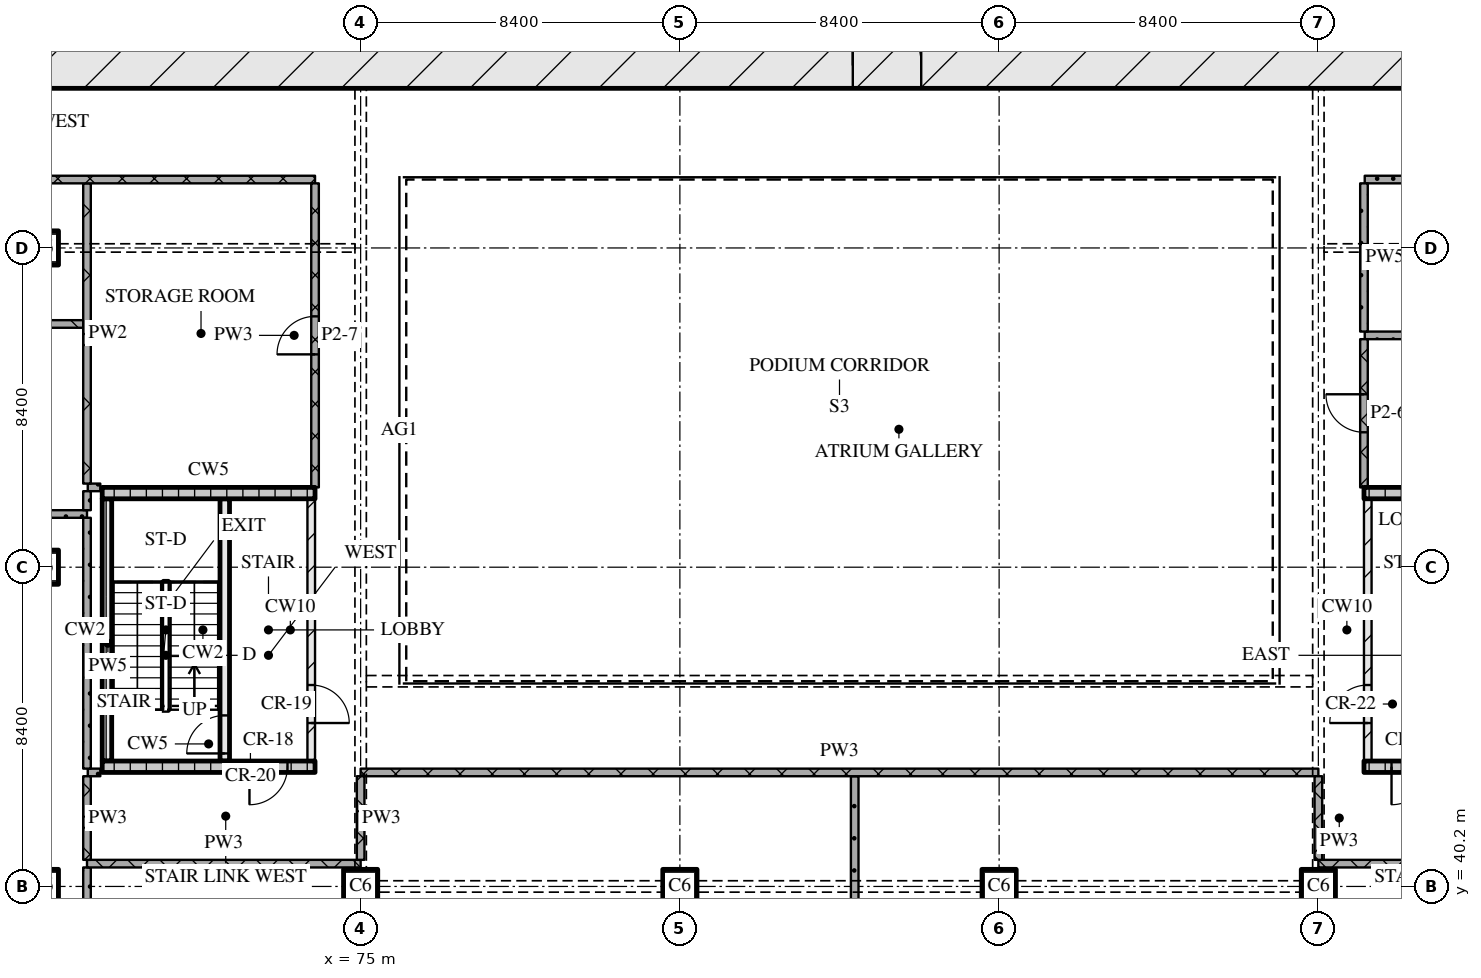
"""IFC4 building model, lengths in metres.
Left out: names, types, materials, properties, quantities, classifications, styles, units other than length and angle.
Written with IfcOpenShell. Run it as: python <this file> out.ifc"""

import sys

from ifc_helpers import new_model, si_unit, direction, frame, frame_2d, origin, origin_2d, place, context, subcontext, project, spatial, rectangle, extrude, element, fill, save


model = new_model("IFC4")
c1 = context("Model", 3, precision=1e-05, world=origin(), true_north=direction((0.0, 1.0)))
c2 = subcontext(c1, "Body", "Model", "MODEL_VIEW")
j1 = project(units=[si_unit("LENGTHUNIT", "METRE"), si_unit("PLANEANGLEUNIT", "RADIAN")], contexts=[c1])
p1 = place(None, origin())
s1 = spatial("IfcSite", under=j1, at=p1, CompositionType="ELEMENT")
p2 = place(p1, origin())
s2 = spatial("IfcBuilding", under=s1, at=p2, CompositionType="ELEMENT")
p3 = place(p2, frame((0.0, 0.0, 14.4)))
s3 = spatial("IfcBuildingStorey", under=s2, at=p3, CompositionType="ELEMENT", Elevation=14.4)
for number, where, z_axis, x_axis in (
    (1, (66.6, 40.2, 0.0), (0.0, 0.0, 1.0), (1.0, 0.0, 0.0)),
    (2, (66.6, 48.6, 0.0), (0.0, 0.0, 1.0), (1.0, 0.0, 0.0)),
    (3, (66.6, 57.0, 0.0), (0.0, 0.0, 1.0), (1.0, 0.0, 0.0)),
    (4, (75.0, 40.2, 0.0), (0.0, 0.0, 1.0), (1.0, 0.0, 0.0)),
    (5, (83.4, 40.2, 0.0), (0.0, 0.0, 1.0), (1.0, 0.0, 0.0)),
    (6, (91.8, 40.2, 0.0), (0.0, 0.0, 1.0), (1.0, 0.0, 0.0)),
    (7, (100.2, 40.2, 0.0), (0.0, 0.0, 1.0), (1.0, 0.0, 0.0)),
):
    element("IfcColumn", number, at=place(p3, frame(where, z_axis=z_axis, x_axis=x_axis)), inside=s3, PredefinedType="COLUMN", context=c2, shape_type="SweptSolid", body=[
        extrude(rectangle(XDim=0.9, YDim=0.9, at=origin_2d()), origin(), (0.0, 0.0, 1.0), 4.8),
    ])
p4 = place(p3, frame((66.6, 61.8, 0.0), z_axis=(0.0, 0.0, 1.0), x_axis=(1.0, 0.0, 0.0)))
e8 = element("IfcWall", 8, at=p4, inside=s3, PredefinedType="SOLIDWALL", context=c2, shape_type="SweptSolid", body=[
    extrude(rectangle(XDim=42.0, YDim=1.2, at=frame_2d((21.0, 0.0))), origin(), (0.0, 0.0, 1.0), 4.5),
])
p5 = place(p4, frame((21.35, 0.0, 0.0)))
e9 = element("IfcOpeningElement", 9, at=p5, cuts=e8, PredefinedType="OPENING", context=c2, shape_type="SweptSolid", body=[
    extrude(rectangle(XDim=1.8, YDim=2.1, at=frame_2d((0.9, 1.05))), frame((0.0, 0.61, 0.0), z_axis=(0.0, -1.0, 0.0), x_axis=(1.0, 0.0, 0.0)), (0.0, 0.0, 1.0), 1.22),
])
p6 = place(p3, frame((68.2, 43.35, 0.0), z_axis=(0.0, 0.0, 1.0), x_axis=(1.0, 0.0, 0.0)))
e10 = element("IfcWall", 10, at=p6, inside=s3, PredefinedType="SOLIDWALL", context=c2, shape_type="SweptSolid", body=[
    extrude(rectangle(XDim=5.6, YDim=0.3, at=frame_2d((2.8, 0.0))), origin(), (0.0, 0.0, 1.0), 4.5),
])
p7 = place(p6, frame((3.875, 0.0, 0.0)))
e11 = element("IfcOpeningElement", 11, at=p7, cuts=e10, PredefinedType="OPENING", context=c2, shape_type="SweptSolid", body=[
    extrude(rectangle(XDim=1.0, YDim=2.1, at=frame_2d((0.5, 1.05))), frame((0.0, 0.16, 0.0), z_axis=(0.0, -1.0, 0.0), x_axis=(1.0, 0.0, 0.0)), (0.0, 0.0, 1.0), 0.32),
])
p8 = place(p3, frame((68.325, 43.5, 0.0), z_axis=(0.0, 0.0, 1.0), x_axis=(0.0, 1.0, 0.0)))
e12 = element("IfcWall", 12, at=p8, inside=s3, PredefinedType="SOLIDWALL", context=c2, shape_type="SweptSolid", body=[
    extrude(rectangle(XDim=6.9, YDim=0.25, at=frame_2d((3.45, 0.0))), origin(), (0.0, 0.0, 1.0), 4.5),
])
p9 = place(p3, frame((71.425, 43.5, 0.0), z_axis=(0.0, 0.0, 1.0), x_axis=(0.0, 1.0, 0.0)))
e13 = element("IfcWall", 13, at=p9, inside=s3, PredefinedType="SOLIDWALL", context=c2, shape_type="SweptSolid", body=[
    extrude(rectangle(XDim=6.9, YDim=0.25, at=frame_2d((3.45, 0.0))), origin(), (0.0, 0.0, 1.0), 4.5),
])
p10 = place(p9, frame((0.2, 0.0, 0.0)))
e14 = element("IfcOpeningElement", 14, at=p10, cuts=e13, PredefinedType="OPENING", context=c2, shape_type="SweptSolid", body=[
    extrude(rectangle(XDim=1.0, YDim=2.1, at=frame_2d((0.5, 1.05))), frame((0.0, 0.135, 0.0), z_axis=(0.0, -1.0, 0.0), x_axis=(1.0, 0.0, 0.0)), (0.0, 0.0, 1.0), 0.27),
])
p11 = place(p3, frame((73.7, 43.5, 0.0), z_axis=(0.0, 0.0, 1.0), x_axis=(0.0, 1.0, 0.0)))
e15 = element("IfcWall", 15, at=p11, inside=s3, PredefinedType="PARTITIONING", context=c2, shape_type="SweptSolid", body=[
    extrude(rectangle(XDim=6.9, YDim=0.2, at=frame_2d((3.45, 0.0))), origin(), (0.0, 0.0, 1.0), 4.5),
])
p12 = place(p11, frame((1.0, 0.0, 0.0)))
e16 = element("IfcOpeningElement", 16, at=p12, cuts=e15, PredefinedType="OPENING", context=c2, shape_type="SweptSolid", body=[
    extrude(rectangle(XDim=1.0, YDim=2.1, at=frame_2d((0.5, 1.05))), frame((0.0, 0.11, 0.0), z_axis=(0.0, -1.0, 0.0), x_axis=(1.0, 0.0, 0.0)), (0.0, 0.0, 1.0), 0.22),
])
p13 = place(p3, frame((68.2, 50.55, 0.0), z_axis=(0.0, 0.0, 1.0), x_axis=(1.0, 0.0, 0.0)))
e17 = element("IfcWall", 17, at=p13, inside=s3, PredefinedType="SOLIDWALL", context=c2, shape_type="SweptSolid", body=[
    extrude(rectangle(XDim=5.6, YDim=0.3, at=frame_2d((2.8, 0.0))), origin(), (0.0, 0.0, 1.0), 4.5),
])
p14 = place(p3, frame((101.4, 43.35, 0.0), z_axis=(0.0, 0.0, 1.0), x_axis=(1.0, 0.0, 0.0)))
e18 = element("IfcWall", 18, at=p14, inside=s3, PredefinedType="SOLIDWALL", context=c2, shape_type="SweptSolid", body=[
    extrude(rectangle(XDim=5.6, YDim=0.3, at=frame_2d((2.8, 0.0))), origin(), (0.0, 0.0, 1.0), 4.5),
])
p15 = place(p14, frame((0.725, 0.0, 0.0)))
e19 = element("IfcOpeningElement", 19, at=p15, cuts=e18, PredefinedType="OPENING", context=c2, shape_type="SweptSolid", body=[
    extrude(rectangle(XDim=1.0, YDim=2.1, at=frame_2d((0.5, 1.05))), frame((0.0, 0.16, 0.0), z_axis=(0.0, -1.0, 0.0), x_axis=(1.0, 0.0, 0.0)), (0.0, 0.0, 1.0), 0.32),
])
p16 = place(p3, frame((101.5, 43.5, 0.0), z_axis=(0.0, 0.0, 1.0), x_axis=(0.0, 1.0, 0.0)))
e20 = element("IfcWall", 20, at=p16, inside=s3, PredefinedType="PARTITIONING", context=c2, shape_type="SweptSolid", body=[
    extrude(rectangle(XDim=6.9, YDim=0.2, at=frame_2d((3.45, 0.0))), origin(), (0.0, 0.0, 1.0), 4.5),
])
p17 = place(p16, frame((1.0, 0.0, 0.0)))
e21 = element("IfcOpeningElement", 21, at=p17, cuts=e20, PredefinedType="OPENING", context=c2, shape_type="SweptSolid", body=[
    extrude(rectangle(XDim=1.0, YDim=2.1, at=frame_2d((0.5, 1.05))), frame((0.0, 0.11, 0.0), z_axis=(0.0, -1.0, 0.0), x_axis=(1.0, 0.0, 0.0)), (0.0, 0.0, 1.0), 0.22),
])
p18 = place(p3, frame((101.4, 50.55, 0.0), z_axis=(0.0, 0.0, 1.0), x_axis=(1.0, 0.0, 0.0)))
e22 = element("IfcWall", 22, at=p18, inside=s3, PredefinedType="SOLIDWALL", context=c2, shape_type="SweptSolid", body=[
    extrude(rectangle(XDim=5.6, YDim=0.3, at=frame_2d((2.8, 0.0))), origin(), (0.0, 0.0, 1.0), 4.5),
])
for number, where, z_axis, x_axis in (
    (23, (67.8, 40.8, 0.0), (0.0, 0.0, 1.0), (1.0, 0.0, 0.0)),
    (24, (100.2, 40.8, 0.0), (0.0, 0.0, 1.0), (1.0, 0.0, 0.0)),
):
    element("IfcWall", number, at=place(p3, frame(where, z_axis=z_axis, x_axis=x_axis)), inside=s3, PredefinedType="PARTITIONING", context=c2, shape_type="SweptSolid", body=[
        extrude(rectangle(XDim=7.2, YDim=0.2, at=frame_2d((3.6, 0.0))), origin(), (0.0, 0.0, 1.0), 4.5),
    ])
p19 = place(p3, frame((75.0, 43.2, 0.0), z_axis=(0.0, 0.0, 1.0), x_axis=(1.0, 0.0, 0.0)))
e25 = element("IfcWall", 25, at=p19, inside=s3, PredefinedType="PARTITIONING", context=c2, shape_type="SweptSolid", body=[
    extrude(rectangle(XDim=25.2, YDim=0.2, at=frame_2d((12.6, 0.0))), origin(), (0.0, 0.0, 1.0), 4.5),
])
p20 = place(p3, frame((67.82, 43.2, 0.0), z_axis=(0.0, 0.0, 1.0), x_axis=(1.0, 0.0, 0.0)))
e26 = element("IfcWall", 26, at=p20, inside=s3, PredefinedType="PARTITIONING", context=c2, shape_type="SweptSolid", body=[
    extrude(rectangle(XDim=0.33, YDim=0.2, at=frame_2d((0.165, 0.0))), origin(), (0.0, 0.0, 1.0), 4.5),
])
p21 = place(p3, frame((35.5, 50.0, 0.0), z_axis=(0.0, 0.0, 1.0), x_axis=(1.0, 0.0, 0.0)))
e27 = element("IfcWall", 27, at=p21, inside=s3, PredefinedType="PARTITIONING", context=c2, shape_type="SweptSolid", body=[
    extrude(rectangle(XDim=32.3, YDim=0.2, at=frame_2d((16.15, 0.0))), origin(), (0.0, 0.0, 1.0), 4.5),
])
p22 = place(p3, frame((67.82, 50.7, 0.0), z_axis=(0.0, 0.0, 1.0), x_axis=(1.0, 0.0, 0.0)))
e28 = element("IfcWall", 28, at=p22, inside=s3, PredefinedType="PARTITIONING", context=c2, shape_type="SweptSolid", body=[
    extrude(rectangle(XDim=0.33, YDim=0.2, at=frame_2d((0.165, 0.0))), origin(), (0.0, 0.0, 1.0), 4.5),
])
p23 = place(p3, frame((101.42, 54.7, 0.0), z_axis=(0.0, 0.0, 1.0), x_axis=(1.0, 0.0, 0.0)))
e29 = element("IfcWall", 29, at=p23, inside=s3, PredefinedType="PARTITIONING", context=c2, shape_type="SweptSolid", body=[
    extrude(rectangle(XDim=5.96, YDim=0.2, at=frame_2d((2.98, 0.0))), origin(), (0.0, 0.0, 1.0), 4.5),
])
p24 = place(p3, frame((35.5, 55.0, 0.0), z_axis=(0.0, 0.0, 1.0), x_axis=(1.0, 0.0, 0.0)))
e30 = element("IfcWall", 30, at=p24, inside=s3, PredefinedType="PARTITIONING", context=c2, shape_type="SweptSolid", body=[
    extrude(rectangle(XDim=32.2, YDim=0.2, at=frame_2d((16.1, 0.0))), origin(), (0.0, 0.0, 1.0), 4.5),
])
p25 = place(p3, frame((73.8, 58.8, 0.0), z_axis=(0.0, 0.0, 1.0), x_axis=(-1.0, 0.0, 0.0)))
e31 = element("IfcWall", 31, at=p25, inside=s3, PredefinedType="PARTITIONING", context=c2, shape_type="SweptSolid", body=[
    extrude(rectangle(XDim=38.4, YDim=0.2, at=frame_2d((19.2, 0.0))), origin(), (0.0, 0.0, 1.0), 4.5),
])
p26 = place(p25, frame((21.7, 0.0, 0.0)))
e32 = element("IfcOpeningElement", 32, at=p26, cuts=e31, PredefinedType="OPENING", context=c2, shape_type="SweptSolid", body=[
    extrude(rectangle(XDim=1.0, YDim=2.1, at=frame_2d((0.5, 1.05))), frame((0.0, 0.11, 0.0), z_axis=(0.0, -1.0, 0.0), x_axis=(1.0, 0.0, 0.0)), (0.0, 0.0, 1.0), 0.22),
])
p27 = place(p3, frame((101.42, 58.8, 0.0), z_axis=(0.0, 0.0, 1.0), x_axis=(1.0, 0.0, 0.0)))
e33 = element("IfcWall", 33, at=p27, inside=s3, PredefinedType="PARTITIONING", context=c2, shape_type="SweptSolid", body=[
    extrude(rectangle(XDim=38.36, YDim=0.2, at=frame_2d((19.18, 0.0))), origin(), (0.0, 0.0, 1.0), 4.5),
])
p28 = place(p3, frame((67.8, 43.1, 0.0), z_axis=(0.0, 0.0, 1.0), x_axis=(0.0, -1.0, 0.0)))
e34 = element("IfcWall", 34, at=p28, inside=s3, PredefinedType="PARTITIONING", context=c2, shape_type="SweptSolid", body=[
    extrude(rectangle(XDim=2.2, YDim=0.2, at=frame_2d((1.1, 0.0))), origin(), (0.0, 0.0, 1.0), 4.5),
])
p29 = place(p3, frame((67.8, 58.7, 0.0), z_axis=(0.0, 0.0, 1.0), x_axis=(0.0, -1.0, 0.0)))
e35 = element("IfcWall", 35, at=p29, inside=s3, PredefinedType="PARTITIONING", context=c2, shape_type="SweptSolid", body=[
    extrude(rectangle(XDim=7.9, YDim=0.2, at=frame_2d((3.95, 0.0))), origin(), (0.0, 0.0, 1.0), 4.5),
])
p30 = place(p3, frame((67.8, 49.9, 0.0), z_axis=(0.0, 0.0, 1.0), x_axis=(0.0, -1.0, 0.0)))
e36 = element("IfcWall", 36, at=p30, inside=s3, PredefinedType="PARTITIONING", context=c2, shape_type="SweptSolid", body=[
    extrude(rectangle(XDim=6.6, YDim=0.2, at=frame_2d((3.3, 0.0))), origin(), (0.0, 0.0, 1.0), 4.5),
])
p31 = place(p3, frame((67.8, 50.6, 0.0), z_axis=(0.0, 0.0, 1.0), x_axis=(0.0, -1.0, 0.0)))
e37 = element("IfcWall", 37, at=p31, inside=s3, PredefinedType="PARTITIONING", context=c2, shape_type="SweptSolid", body=[
    extrude(rectangle(XDim=0.5, YDim=0.2, at=frame_2d((0.25, 0.0))), origin(), (0.0, 0.0, 1.0), 4.5),
])
p32 = place(p3, frame((67.8, 40.7, 0.0), z_axis=(0.0, 0.0, 1.0), x_axis=(0.0, -1.0, 0.0)))
e38 = element("IfcWall", 38, at=p32, inside=s3, PredefinedType="PARTITIONING", context=c2, shape_type="SweptSolid", body=[
    extrude(rectangle(XDim=20.2, YDim=0.2, at=frame_2d((10.1, 0.0))), origin(), (0.0, 0.0, 1.0), 4.5),
])
p33 = place(p3, frame((73.8, 50.7, 0.0), z_axis=(0.0, 0.0, 1.0), x_axis=(0.0, 1.0, 0.0)))
e39 = element("IfcWall", 39, at=p33, inside=s3, PredefinedType="PARTITIONING", context=c2, shape_type="SweptSolid", body=[
    extrude(rectangle(XDim=8.0, YDim=0.2, at=frame_2d((4.0, 0.0))), origin(), (0.0, 0.0, 1.0), 4.5),
])
p34 = place(p33, frame((3.5, 0.0, 0.0)))
e40 = element("IfcOpeningElement", 40, at=p34, cuts=e39, PredefinedType="OPENING", context=c2, shape_type="SweptSolid", body=[
    extrude(rectangle(XDim=1.0, YDim=2.1, at=frame_2d((0.5, 1.05))), frame((0.0, 0.11, 0.0), z_axis=(0.0, -1.0, 0.0), x_axis=(1.0, 0.0, 0.0)), (0.0, 0.0, 1.0), 0.22),
])
p35 = place(p3, frame((75.0, 43.1, 0.0), z_axis=(0.0, 0.0, 1.0), x_axis=(0.0, -1.0, 0.0)))
e41 = element("IfcWall", 41, at=p35, inside=s3, PredefinedType="PARTITIONING", context=c2, shape_type="SweptSolid", body=[
    extrude(rectangle(XDim=2.2, YDim=0.2, at=frame_2d((1.1, 0.0))), origin(), (0.0, 0.0, 1.0), 3.6),
])
p36 = place(p3, frame((88.0, 43.1, 0.0), z_axis=(0.0, 0.0, 1.0), x_axis=(0.0, -1.0, 0.0)))
e42 = element("IfcWall", 42, at=p36, inside=s3, PredefinedType="PARTITIONING", context=c2, shape_type="SweptSolid", body=[
    extrude(rectangle(XDim=22.6, YDim=0.2, at=frame_2d((11.3, 0.0))), origin(), (0.0, 0.0, 1.0), 4.5),
])
p37 = place(p3, frame((100.2, 43.1, 0.0), z_axis=(0.0, 0.0, 1.0), x_axis=(0.0, -1.0, 0.0)))
e43 = element("IfcWall", 43, at=p37, inside=s3, PredefinedType="PARTITIONING", context=c2, shape_type="SweptSolid", body=[
    extrude(rectangle(XDim=2.2, YDim=0.2, at=frame_2d((1.1, 0.0))), origin(), (0.0, 0.0, 1.0), 3.6),
])
p38 = place(p3, frame((101.4, 54.6, 0.0), z_axis=(0.0, 0.0, 1.0), x_axis=(0.0, -1.0, 0.0)))
e44 = element("IfcWall", 44, at=p38, inside=s3, PredefinedType="PARTITIONING", context=c2, shape_type="SweptSolid", body=[
    extrude(rectangle(XDim=3.9, YDim=0.2, at=frame_2d((1.95, 0.0))), origin(), (0.0, 0.0, 1.0), 4.5),
])
p39 = place(p38, frame((1.45, 0.0, 0.0)))
e45 = element("IfcOpeningElement", 45, at=p39, cuts=e44, PredefinedType="OPENING", context=c2, shape_type="SweptSolid", body=[
    extrude(rectangle(XDim=1.0, YDim=2.1, at=frame_2d((0.5, 1.05))), frame((0.0, 0.11, 0.0), z_axis=(0.0, -1.0, 0.0), x_axis=(1.0, 0.0, 0.0)), (0.0, 0.0, 1.0), 0.22),
])
p40 = place(p3, frame((101.4, 58.7, 0.0), z_axis=(0.0, 0.0, 1.0), x_axis=(0.0, -1.0, 0.0)))
e46 = element("IfcWall", 46, at=p40, inside=s3, PredefinedType="PARTITIONING", context=c2, shape_type="SweptSolid", body=[
    extrude(rectangle(XDim=3.9, YDim=0.2, at=frame_2d((1.95, 0.0))), origin(), (0.0, 0.0, 1.0), 4.5),
])
p41 = place(p5, origin())
e47 = element("IfcDoor", 47, at=p41, inside=s3, OperationType="DOUBLE_DOOR_SINGLE_SWING", PredefinedType="DOOR", context=c2, shape_type="SweptSolid", body=[
    extrude(rectangle(XDim=1.8, YDim=2.1, at=frame_2d((0.9, 1.05))), frame((0.0, 0.025, 0.0), z_axis=(0.0, -1.0, 0.0), x_axis=(1.0, 0.0, 0.0)), (0.0, 0.0, 1.0), 0.05),
])
fill(e9, e47)
p42 = place(p7, origin())
e48 = element("IfcDoor", 48, at=p42, inside=s3, OperationType="SINGLE_SWING_RIGHT", PredefinedType="DOOR", context=c2, shape_type="SweptSolid", body=[
    extrude(rectangle(XDim=1.0, YDim=2.1, at=frame_2d((0.5, 1.05))), frame((0.0, 0.025, 0.0), z_axis=(0.0, -1.0, 0.0), x_axis=(1.0, 0.0, 0.0)), (0.0, 0.0, 1.0), 0.05),
])
fill(e11, e48)
p43 = place(p10, origin())
e49 = element("IfcDoor", 49, at=p43, inside=s3, OperationType="SINGLE_SWING_LEFT", PredefinedType="DOOR", context=c2, shape_type="SweptSolid", body=[
    extrude(rectangle(XDim=1.0, YDim=2.1, at=frame_2d((0.5, 1.05))), frame((0.0, 0.025, 0.0), z_axis=(0.0, -1.0, 0.0), x_axis=(1.0, 0.0, 0.0)), (0.0, 0.0, 1.0), 0.05),
])
fill(e14, e49)
p44 = place(p12, origin())
e50 = element("IfcDoor", 50, at=p44, inside=s3, OperationType="SINGLE_SWING_RIGHT", PredefinedType="DOOR", context=c2, shape_type="SweptSolid", body=[
    extrude(rectangle(XDim=1.0, YDim=2.1, at=frame_2d((0.5, 1.05))), frame((0.0, 0.025, 0.0), z_axis=(0.0, -1.0, 0.0), x_axis=(1.0, 0.0, 0.0)), (0.0, 0.0, 1.0), 0.05),
])
fill(e16, e50)
p45 = place(p15, origin())
e51 = element("IfcDoor", 51, at=p45, inside=s3, OperationType="SINGLE_SWING_RIGHT", PredefinedType="DOOR", context=c2, shape_type="SweptSolid", body=[
    extrude(rectangle(XDim=1.0, YDim=2.1, at=frame_2d((0.5, 1.05))), frame((0.0, 0.025, 0.0), z_axis=(0.0, -1.0, 0.0), x_axis=(1.0, 0.0, 0.0)), (0.0, 0.0, 1.0), 0.05),
])
fill(e19, e51)
p46 = place(p17, origin())
e52 = element("IfcDoor", 52, at=p46, inside=s3, OperationType="SINGLE_SWING_LEFT", PredefinedType="DOOR", context=c2, shape_type="SweptSolid", body=[
    extrude(rectangle(XDim=1.0, YDim=2.1, at=frame_2d((0.5, 1.05))), frame((0.0, 0.025, 0.0), z_axis=(0.0, -1.0, 0.0), x_axis=(1.0, 0.0, 0.0)), (0.0, 0.0, 1.0), 0.05),
])
fill(e21, e52)
p47 = place(p34, origin())
e53 = element("IfcDoor", 53, at=p47, inside=s3, OperationType="SINGLE_SWING_LEFT", PredefinedType="DOOR", context=c2, shape_type="SweptSolid", body=[
    extrude(rectangle(XDim=1.0, YDim=2.1, at=frame_2d((0.5, 1.05))), frame((0.0, 0.025, 0.0), z_axis=(0.0, -1.0, 0.0), x_axis=(1.0, 0.0, 0.0)), (0.0, 0.0, 1.0), 0.05),
])
fill(e40, e53)
p48 = place(p39, origin())
e54 = element("IfcDoor", 54, at=p48, inside=s3, OperationType="SINGLE_SWING_RIGHT", PredefinedType="DOOR", context=c2, shape_type="SweptSolid", body=[
    extrude(rectangle(XDim=1.0, YDim=2.1, at=frame_2d((0.5, 1.05))), frame((0.0, 0.025, 0.0), z_axis=(0.0, -1.0, 0.0), x_axis=(1.0, 0.0, 0.0)), (0.0, 0.0, 1.0), 0.05),
])
fill(e45, e54)
save(model, sys.argv[1])
